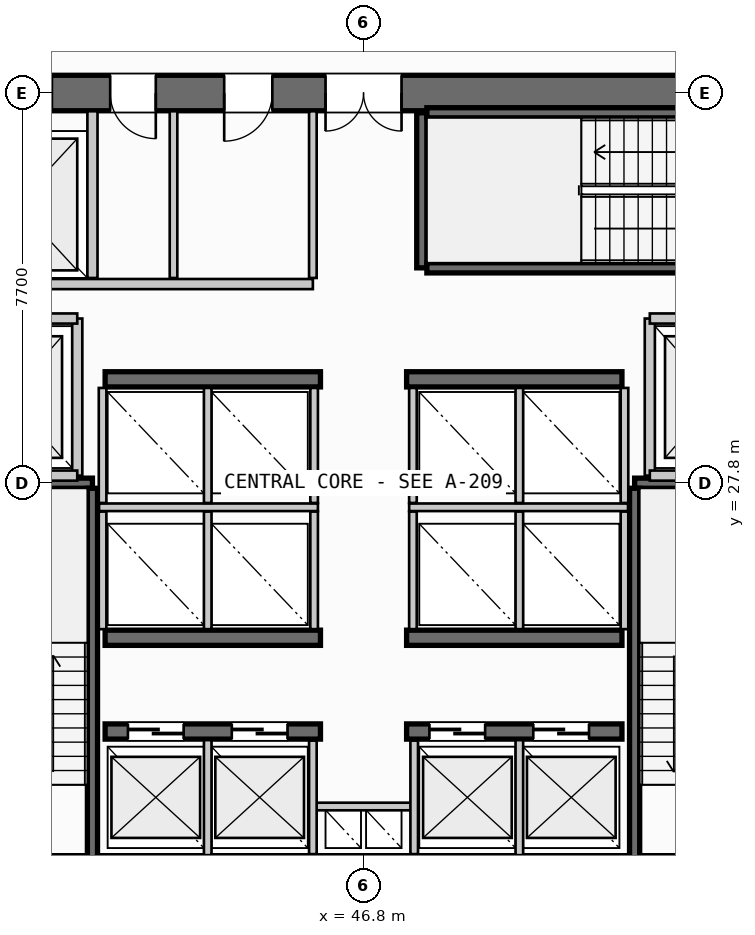
"""IFC4 building model, lengths in metres.
Left out: names, types, materials, properties, quantities, classifications, styles, units other than length and angle.
Written with IfcOpenShell. Run it as: python <this file> out.ifc"""

import sys

from ifc_helpers import new_model, si_unit, direction, frame, frame_2d, origin, place, context, subcontext, project, spatial, rectangle, extrude, source, transform, mapped, element, fill, save


model = new_model("IFC4")
c1 = context("Model", 3, precision=1e-05, world=origin(), true_north=direction((0.0, 1.0)))
c2 = subcontext(c1, "Body", "Model", "MODEL_VIEW")
j1 = project(units=[si_unit("LENGTHUNIT", "METRE"), si_unit("PLANEANGLEUNIT", "RADIAN")], contexts=[c1])
p1 = place(None, origin())
s1 = spatial("IfcSite", under=j1, at=p1, CompositionType="ELEMENT")
p2 = place(p1, origin())
s2 = spatial("IfcBuilding", under=s1, at=p2, CompositionType="ELEMENT")
p3 = place(p2, frame((0.0, 0.0, 63.8)))
s3 = spatial("IfcBuildingStorey", under=s2, at=p3, CompositionType="ELEMENT", Elevation=63.8)
p4 = place(p3, frame((38.0, 20.1, 0.0), z_axis=(0.0, 0.0, 1.0), x_axis=(1.0, 0.0, 0.0)))
e1 = element("IfcWall", 1, at=p4, inside=s3, PredefinedType="SHEAR", context=c2, shape_type="SweptSolid", body=[
    extrude(rectangle(XDim=17.6, YDim=0.7, at=frame_2d((8.8, 0.0))), origin(), (0.0, 0.0, 1.0), 3.55),
])
p5 = place(p4, frame((1.4, 0.0, 0.0)))
e2 = element("IfcOpeningElement", 2, at=p5, cuts=e1, PredefinedType="OPENING", context=c2, shape_type="SweptSolid", body=[
    extrude(rectangle(XDim=1.05, YDim=2.15, at=frame_2d((0.525, 1.075))), frame((0.0, 0.36, 0.0), z_axis=(0.0, -1.0, 0.0), x_axis=(1.0, 0.0, 0.0)), (0.0, 0.0, 1.0), 0.72),
])
p6 = place(p4, frame((15.15, 0.0, 0.0)))
e3 = element("IfcOpeningElement", 3, at=p6, cuts=e1, PredefinedType="OPENING", context=c2, shape_type="SweptSolid", body=[
    extrude(rectangle(XDim=1.05, YDim=2.15, at=frame_2d((0.525, 1.075))), frame((0.0, 0.36, 0.0), z_axis=(0.0, -1.0, 0.0), x_axis=(1.0, 0.0, 0.0)), (0.0, 0.0, 1.0), 0.72),
])
p7 = place(p3, frame((55.6, 35.5, 0.0), z_axis=(0.0, 0.0, 1.0), x_axis=(-1.0, 0.0, 0.0)))
e4 = element("IfcWall", 4, at=p7, inside=s3, PredefinedType="SHEAR", context=c2, shape_type="SweptSolid", body=[
    extrude(rectangle(XDim=17.6, YDim=0.7, at=frame_2d((8.8, 0.0))), origin(), (0.0, 0.0, 1.0), 3.55),
])
p8 = place(p7, frame((8.05, 0.0, 0.0)))
e5 = element("IfcOpeningElement", 5, at=p8, cuts=e4, PredefinedType="OPENING", context=c2, shape_type="SweptSolid", body=[
    extrude(rectangle(XDim=1.5, YDim=2.2, at=frame_2d((0.75, 1.1))), frame((0.0, 0.36, 0.0), z_axis=(0.0, -1.0, 0.0), x_axis=(1.0, 0.0, 0.0)), (0.0, 0.0, 1.0), 0.72),
])
p9 = place(p7, frame((14.95, 0.0, 0.0)))
e6 = element("IfcOpeningElement", 6, at=p9, cuts=e4, PredefinedType="OPENING", context=c2, shape_type="SweptSolid", body=[
    extrude(rectangle(XDim=1.4, YDim=2.3, at=frame_2d((0.7, 1.15))), frame((0.0, 0.36, 0.0), z_axis=(0.0, -1.0, 0.0), x_axis=(1.0, 0.0, 0.0)), (0.0, 0.0, 1.0), 0.72),
])
p10 = place(p7, frame((12.9, 0.0, 0.0)))
e7 = element("IfcOpeningElement", 7, at=p10, cuts=e4, PredefinedType="OPENING", context=c2, shape_type="SweptSolid", body=[
    extrude(rectangle(XDim=0.9, YDim=2.15, at=frame_2d((0.45, 1.075))), frame((0.0, 0.36, 0.0), z_axis=(0.0, -1.0, 0.0), x_axis=(1.0, 0.0, 0.0)), (0.0, 0.0, 1.0), 0.72),
])
p11 = place(p7, frame((10.6, 0.0, 0.0)))
e8 = element("IfcOpeningElement", 8, at=p11, cuts=e4, PredefinedType="OPENING", context=c2, shape_type="SweptSolid", body=[
    extrude(rectangle(XDim=0.95, YDim=2.15, at=frame_2d((0.475, 1.075))), frame((0.0, 0.36, 0.0), z_axis=(0.0, -1.0, 0.0), x_axis=(1.0, 0.0, 0.0)), (0.0, 0.0, 1.0), 0.72),
])
p12 = place(p3, frame((41.7, 22.9, 0.0), z_axis=(0.0, 0.0, 1.0), x_axis=(1.0, 0.0, 0.0)))
e9 = element("IfcWall", 9, at=p12, inside=s3, PredefinedType="SHEAR", context=c2, shape_type="SweptSolid", body=[
    extrude(rectangle(XDim=4.25, YDim=0.3, at=frame_2d((2.125, 0.0))), origin(), (0.0, 0.0, 1.0), 3.55),
])
p13 = place(p12, frame((0.45, 0.0, 0.0)))
e10 = element("IfcOpeningElement", 10, at=p13, cuts=e9, PredefinedType="OPENING", context=c2, shape_type="SweptSolid", body=[
    extrude(rectangle(XDim=1.1, YDim=2.2, at=frame_2d((0.55, 1.1))), frame((0.0, 0.16, 0.0), z_axis=(0.0, -1.0, 0.0), x_axis=(1.0, 0.0, 0.0)), (0.0, 0.0, 1.0), 0.32),
])
p14 = place(p12, frame((2.5, 0.0, 0.0)))
e11 = element("IfcOpeningElement", 11, at=p14, cuts=e9, PredefinedType="OPENING", context=c2, shape_type="SweptSolid", body=[
    extrude(rectangle(XDim=1.1, YDim=2.2, at=frame_2d((0.55, 1.1))), frame((0.0, 0.16, 0.0), z_axis=(0.0, -1.0, 0.0), x_axis=(1.0, 0.0, 0.0)), (0.0, 0.0, 1.0), 0.32),
])
p15 = place(p3, frame((47.65, 22.9, 0.0), z_axis=(0.0, 0.0, 1.0), x_axis=(1.0, 0.0, 0.0)))
e12 = element("IfcWall", 12, at=p15, inside=s3, PredefinedType="SHEAR", context=c2, shape_type="SweptSolid", body=[
    extrude(rectangle(XDim=4.25, YDim=0.3, at=frame_2d((2.125, 0.0))), origin(), (0.0, 0.0, 1.0), 3.55),
])
p16 = place(p15, frame((0.45, 0.0, 0.0)))
e13 = element("IfcOpeningElement", 13, at=p16, cuts=e12, PredefinedType="OPENING", context=c2, shape_type="SweptSolid", body=[
    extrude(rectangle(XDim=1.1, YDim=2.2, at=frame_2d((0.55, 1.1))), frame((0.0, 0.16, 0.0), z_axis=(0.0, -1.0, 0.0), x_axis=(1.0, 0.0, 0.0)), (0.0, 0.0, 1.0), 0.32),
])
p17 = place(p15, frame((2.5, 0.0, 0.0)))
e14 = element("IfcOpeningElement", 14, at=p17, cuts=e12, PredefinedType="OPENING", context=c2, shape_type="SweptSolid", body=[
    extrude(rectangle(XDim=1.1, YDim=2.2, at=frame_2d((0.55, 1.1))), frame((0.0, 0.16, 0.0), z_axis=(0.0, -1.0, 0.0), x_axis=(1.0, 0.0, 0.0)), (0.0, 0.0, 1.0), 0.32),
])
for number, where, z_axis, x_axis in (
    (15, (41.7, 24.75, 0.0), (0.0, 0.0, 1.0), (1.0, 0.0, 0.0)),
    (16, (47.65, 24.75, 0.0), (0.0, 0.0, 1.0), (1.0, 0.0, 0.0)),
    (17, (41.7, 29.85, 0.0), (0.0, 0.0, 1.0), (1.0, 0.0, 0.0)),
    (18, (47.65, 29.85, 0.0), (0.0, 0.0, 1.0), (1.0, 0.0, 0.0)),
):
    element("IfcWall", number, at=place(p3, frame(where, z_axis=z_axis, x_axis=x_axis)), inside=s3, PredefinedType="SHEAR", context=c2, shape_type="SweptSolid", body=[
        extrude(rectangle(XDim=4.25, YDim=0.3, at=frame_2d((2.125, 0.0))), origin(), (0.0, 0.0, 1.0), 3.55),
    ])
p18 = place(p3, frame((38.39, 27.8, 0.0), z_axis=(0.0, 0.0, 1.0), x_axis=(1.0, 0.0, 0.0)))
e19 = element("IfcWall", 19, at=p18, inside=s3, PredefinedType="SHEAR", context=c2, shape_type="SweptSolid", body=[
    extrude(rectangle(XDim=3.06, YDim=0.2, at=frame_2d((1.53, 0.0))), origin(), (0.0, 0.0, 1.0), 3.55),
])
p19 = place(p3, frame((41.45, 27.7, 0.0), z_axis=(0.0, 0.0, 1.0), x_axis=(0.0, -1.0, 0.0)))
e20 = element("IfcWall", 20, at=p19, inside=s3, PredefinedType="SHEAR", context=c2, shape_type="SweptSolid", body=[
    extrude(rectangle(XDim=7.35, YDim=0.2, at=frame_2d((3.675, 0.0))), origin(), (0.0, 0.0, 1.0), 3.55),
])
p20 = place(p3, frame((52.15, 27.8, 0.0), z_axis=(0.0, 0.0, 1.0), x_axis=(1.0, 0.0, 0.0)))
e21 = element("IfcWall", 21, at=p20, inside=s3, PredefinedType="SHEAR", context=c2, shape_type="SweptSolid", body=[
    extrude(rectangle(XDim=3.06, YDim=0.2, at=frame_2d((1.53, 0.0))), origin(), (0.0, 0.0, 1.0), 3.55),
])
p21 = place(p3, frame((52.15, 20.35, 0.0), z_axis=(0.0, 0.0, 1.0), x_axis=(0.0, 1.0, 0.0)))
e22 = element("IfcWall", 22, at=p21, inside=s3, PredefinedType="SHEAR", context=c2, shape_type="SweptSolid", body=[
    extrude(rectangle(XDim=7.35, YDim=0.2, at=frame_2d((3.675, 0.0))), origin(), (0.0, 0.0, 1.0), 3.55),
])
p22 = place(p3, frame((47.95, 32.05, 0.0), z_axis=(0.0, 0.0, 1.0), x_axis=(0.0, 1.0, 0.0)))
e23 = element("IfcWall", 23, at=p22, inside=s3, PredefinedType="SHEAR", context=c2, shape_type="SweptSolid", body=[
    extrude(rectangle(XDim=3.06, YDim=0.2, at=frame_2d((1.53, 0.0))), origin(), (0.0, 0.0, 1.0), 3.55),
])
for number, where, z_axis, x_axis in (
    (24, (48.05, 35.11, 0.0), (0.0, 0.0, 1.0), (1.0, 0.0, 0.0)),
    (25, (55.4, 32.05, 0.0), (0.0, 0.0, 1.0), (-1.0, 0.0, 0.0)),
):
    element("IfcWall", number, at=place(p3, frame(where, z_axis=z_axis, x_axis=x_axis)), inside=s3, PredefinedType="SHEAR", context=c2, shape_type="SweptSolid", body=[
        extrude(rectangle(XDim=7.35, YDim=0.2, at=frame_2d((3.675, 0.0))), origin(), (0.0, 0.0, 1.0), 3.55),
    ])
p23 = place(p3, frame((45.8, 21.42, 0.0), z_axis=(0.0, 0.0, 1.0), x_axis=(1.0, 0.0, 0.0)))
e26 = element("IfcWall", 26, at=p23, inside=s3, PredefinedType="PARTITIONING", context=c2, shape_type="SweptSolid", body=[
    extrude(rectangle(XDim=2.0, YDim=0.15, at=frame_2d((1.0, 0.0))), origin(), (0.0, 0.0, 1.0), 2.505),
])
for number, where, z_axis, x_axis in (
    (27, (45.8, 20.48, 0.0), (0.0, 0.0, 1.0), (0.0, 1.0, 0.0)),
    (28, (47.8, 20.48, 0.0), (0.0, 0.0, 1.0), (0.0, 1.0, 0.0)),
):
    element("IfcWall", number, at=place(p3, frame(where, z_axis=z_axis, x_axis=x_axis)), inside=s3, PredefinedType="PARTITIONING", context=c2, shape_type="SweptSolid", body=[
        extrude(rectangle(XDim=2.24, YDim=0.15, at=frame_2d((1.12, 0.0))), origin(), (0.0, 0.0, 1.0), 2.505),
    ])
p24 = place(p3, frame((41.15, 27.95, 0.0), z_axis=(0.0, 0.0, 1.0), x_axis=(0.0, 1.0, 0.0)))
e29 = element("IfcWall", 29, at=p24, inside=s3, PredefinedType="PARTITIONING", context=c2, shape_type="SweptSolid", body=[
    extrude(rectangle(XDim=3.1, YDim=0.2, at=frame_2d((1.55, 0.0))), origin(), (0.0, 0.0, 1.0), 2.505),
])
for number, where, z_axis, x_axis in (
    (30, (38.36, 27.95, 0.0), (0.0, 0.0, 1.0), (1.0, 0.0, 0.0)),
    (31, (38.36, 31.05, 0.0), (0.0, 0.0, 1.0), (1.0, 0.0, 0.0)),
):
    element("IfcWall", number, at=place(p3, frame(where, z_axis=z_axis, x_axis=x_axis)), inside=s3, PredefinedType="PARTITIONING", context=c2, shape_type="SweptSolid", body=[
        extrude(rectangle(XDim=2.79, YDim=0.2, at=frame_2d((1.395, 0.0))), origin(), (0.0, 0.0, 1.0), 2.505),
    ])
p25 = place(p3, frame((52.45, 27.95, 0.0), z_axis=(0.0, 0.0, 1.0), x_axis=(0.0, 1.0, 0.0)))
e32 = element("IfcWall", 32, at=p25, inside=s3, PredefinedType="PARTITIONING", context=c2, shape_type="SweptSolid", body=[
    extrude(rectangle(XDim=3.1, YDim=0.2, at=frame_2d((1.55, 0.0))), origin(), (0.0, 0.0, 1.0), 2.505),
])
for number, where, z_axis, x_axis in (
    (33, (52.45, 27.95, 0.0), (0.0, 0.0, 1.0), (1.0, 0.0, 0.0)),
    (34, (52.45, 31.05, 0.0), (0.0, 0.0, 1.0), (1.0, 0.0, 0.0)),
):
    element("IfcWall", number, at=place(p3, frame(where, z_axis=z_axis, x_axis=x_axis)), inside=s3, PredefinedType="PARTITIONING", context=c2, shape_type="SweptSolid", body=[
        extrude(rectangle(XDim=2.79, YDim=0.2, at=frame_2d((1.395, 0.0))), origin(), (0.0, 0.0, 1.0), 2.505),
    ])
for number, where, z_axis, x_axis in (
    (35, (43.725, 20.46, 0.0), (0.0, 0.0, 1.0), (0.0, 1.0, 0.0)),
    (36, (49.875, 20.46, 0.0), (0.0, 0.0, 1.0), (0.0, 1.0, 0.0)),
):
    element("IfcWall", number, at=place(p3, frame(where, z_axis=z_axis, x_axis=x_axis)), inside=s3, PredefinedType="PARTITIONING", context=c2, shape_type="SweptSolid", body=[
        extrude(rectangle(XDim=2.27, YDim=0.15, at=frame_2d((1.135, 0.0))), origin(), (0.0, 0.0, 1.0), 2.505),
    ])
p26 = place(p3, frame((41.58, 27.325, 0.0), z_axis=(0.0, 0.0, 1.0), x_axis=(1.0, 0.0, 0.0)))
e37 = element("IfcWall", 37, at=p26, inside=s3, PredefinedType="PARTITIONING", context=c2, shape_type="SweptSolid", body=[
    extrude(rectangle(XDim=4.32, YDim=0.15, at=frame_2d((2.16, 0.0))), origin(), (0.0, 0.0, 1.0), 2.505),
])
p27 = place(p3, frame((47.7, 27.325, 0.0), z_axis=(0.0, 0.0, 1.0), x_axis=(1.0, 0.0, 0.0)))
e38 = element("IfcWall", 38, at=p27, inside=s3, PredefinedType="PARTITIONING", context=c2, shape_type="SweptSolid", body=[
    extrude(rectangle(XDim=4.32, YDim=0.15, at=frame_2d((2.16, 0.0))), origin(), (0.0, 0.0, 1.0), 2.505),
])
for number, where, z_axis, x_axis in (
    (39, (41.65, 24.92, 0.0), (0.0, 0.0, 1.0), (0.0, 1.0, 0.0)),
    (40, (43.725, 24.92, 0.0), (0.0, 0.0, 1.0), (0.0, 1.0, 0.0)),
    (41, (45.825, 24.92, 0.0), (0.0, 0.0, 1.0), (0.0, 1.0, 0.0)),
    (42, (47.775, 24.92, 0.0), (0.0, 0.0, 1.0), (0.0, 1.0, 0.0)),
    (43, (49.875, 24.92, 0.0), (0.0, 0.0, 1.0), (0.0, 1.0, 0.0)),
    (44, (51.95, 24.92, 0.0), (0.0, 0.0, 1.0), (0.0, 1.0, 0.0)),
):
    element("IfcWall", number, at=place(p3, frame(where, z_axis=z_axis, x_axis=x_axis)), inside=s3, PredefinedType="PARTITIONING", context=c2, shape_type="SweptSolid", body=[
        extrude(rectangle(XDim=2.32, YDim=0.15, at=frame_2d((1.16, 0.0))), origin(), (0.0, 0.0, 1.0), 2.505),
    ])
for number, where, z_axis, x_axis in (
    (45, (41.65, 27.41, 0.0), (0.0, 0.0, 1.0), (0.0, 1.0, 0.0)),
    (46, (43.725, 27.41, 0.0), (0.0, 0.0, 1.0), (0.0, 1.0, 0.0)),
    (47, (45.825, 27.41, 0.0), (0.0, 0.0, 1.0), (0.0, 1.0, 0.0)),
    (48, (47.775, 27.41, 0.0), (0.0, 0.0, 1.0), (0.0, 1.0, 0.0)),
    (49, (49.875, 27.41, 0.0), (0.0, 0.0, 1.0), (0.0, 1.0, 0.0)),
    (50, (51.95, 27.41, 0.0), (0.0, 0.0, 1.0), (0.0, 1.0, 0.0)),
):
    element("IfcWall", number, at=place(p3, frame(where, z_axis=z_axis, x_axis=x_axis)), inside=s3, PredefinedType="PARTITIONING", context=c2, shape_type="SweptSolid", body=[
        extrude(rectangle(XDim=2.27, YDim=0.15, at=frame_2d((1.135, 0.0))), origin(), (0.0, 0.0, 1.0), 2.505),
    ])
p28 = place(p3, frame((41.45, 31.85, 0.0), z_axis=(0.0, 0.0, 1.0), x_axis=(0.0, 1.0, 0.0)))
e51 = element("IfcWall", 51, at=p28, inside=s3, PredefinedType="PARTITIONING", context=c2, shape_type="SweptSolid", body=[
    extrude(rectangle(XDim=3.29, YDim=0.2, at=frame_2d((1.645, 0.0))), origin(), (0.0, 0.0, 1.0), 2.505),
])
p29 = place(p3, frame((38.36, 31.73, 0.0), z_axis=(0.0, 0.0, 1.0), x_axis=(1.0, 0.0, 0.0)))
e52 = element("IfcWall", 52, at=p29, inside=s3, PredefinedType="PARTITIONING", context=c2, shape_type="SweptSolid", body=[
    extrude(rectangle(XDim=7.44, YDim=0.2, at=frame_2d((3.72, 0.0))), origin(), (0.0, 0.0, 1.0), 2.505),
])
p30 = place(p3, frame((45.8, 31.85, 0.0), z_axis=(0.0, 0.0, 1.0), x_axis=(0.0, 1.0, 0.0)))
e53 = element("IfcWall", 53, at=p30, inside=s3, PredefinedType="PARTITIONING", context=c2, shape_type="SweptSolid", body=[
    extrude(rectangle(XDim=3.29, YDim=0.15, at=frame_2d((1.645, 0.0))), origin(), (0.0, 0.0, 1.0), 2.505),
])
p31 = place(p3, frame((43.05, 31.85, 0.0), z_axis=(0.0, 0.0, 1.0), x_axis=(0.0, 1.0, 0.0)))
e54 = element("IfcWall", 54, at=p31, inside=s3, PredefinedType="PLUMBINGWALL", context=c2, shape_type="SweptSolid", body=[
    extrude(rectangle(XDim=3.29, YDim=0.15, at=frame_2d((1.645, 0.0))), origin(), (0.0, 0.0, 1.0), 2.505),
])
m1 = source(origin(), c2, "Body", "SweptSolid", [
    extrude(rectangle(XDim=1.5, YDim=2.2, at=frame_2d((0.75, 1.1))), frame((0.0, 0.025, 0.0), z_axis=(0.0, -1.0, 0.0), x_axis=(1.0, 0.0, 0.0)), (0.0, 0.0, 1.0), 0.05),
])
p32 = place(p8, origin())
e55 = element("IfcDoor", 55, at=p32, inside=s3, OperationType="DOUBLE_DOOR_SINGLE_SWING", PredefinedType="DOOR", context=c2, shape_type="MappedRepresentation", body=[
    mapped(m1, transform((0.0, 0.0, 0.0), scale=1.0)),
])
fill(e5, e55)
m2 = source(origin(), c2, "Body", "SweptSolid", [
    extrude(rectangle(XDim=1.1, YDim=2.2, at=frame_2d((0.55, 1.1))), frame((0.0, 0.025, 0.0), z_axis=(0.0, -1.0, 0.0), x_axis=(1.0, 0.0, 0.0)), (0.0, 0.0, 1.0), 0.05),
])
p33 = place(p13, origin())
e56 = element("IfcDoor", 56, at=p33, inside=s3, OperationType="SLIDING_TO_LEFT", PredefinedType="DOOR", context=c2, shape_type="MappedRepresentation", body=[
    mapped(m2, transform((0.0, 0.0, 0.0), scale=1.0)),
])
fill(e10, e56)
p34 = place(p14, origin())
e57 = element("IfcDoor", 57, at=p34, inside=s3, OperationType="SLIDING_TO_LEFT", PredefinedType="DOOR", context=c2, shape_type="MappedRepresentation", body=[
    mapped(m2, transform((0.0, 0.0, 0.0), scale=1.0)),
])
fill(e11, e57)
p35 = place(p16, origin())
e58 = element("IfcDoor", 58, at=p35, inside=s3, OperationType="SLIDING_TO_LEFT", PredefinedType="DOOR", context=c2, shape_type="MappedRepresentation", body=[
    mapped(m2, transform((0.0, 0.0, 0.0), scale=1.0)),
])
fill(e13, e58)
p36 = place(p17, origin())
e59 = element("IfcDoor", 59, at=p36, inside=s3, OperationType="SLIDING_TO_LEFT", PredefinedType="DOOR", context=c2, shape_type="MappedRepresentation", body=[
    mapped(m2, transform((0.0, 0.0, 0.0), scale=1.0)),
])
fill(e14, e59)
m3 = source(origin(), c2, "Body", "SweptSolid", [
    extrude(rectangle(XDim=1.4, YDim=2.3, at=frame_2d((0.7, 1.15))), frame((0.0, 0.025, 0.0), z_axis=(0.0, -1.0, 0.0), x_axis=(1.0, 0.0, 0.0)), (0.0, 0.0, 1.0), 0.05),
])
p37 = place(p9, origin())
e60 = element("IfcDoor", 60, at=p37, inside=s3, OperationType="SLIDING_TO_RIGHT", PredefinedType="DOOR", context=c2, shape_type="MappedRepresentation", body=[
    mapped(m3, transform((0.0, 0.0, 0.0), scale=1.0)),
])
fill(e6, e60)
m4 = source(origin(), c2, "Body", "SweptSolid", [
    extrude(rectangle(XDim=0.9, YDim=2.15, at=frame_2d((0.45, 1.075))), frame((0.0, 0.025, 0.0), z_axis=(0.0, -1.0, 0.0), x_axis=(1.0, 0.0, 0.0)), (0.0, 0.0, 1.0), 0.05),
])
p38 = place(p10, origin())
e61 = element("IfcDoor", 61, at=p38, inside=s3, OperationType="SINGLE_SWING_LEFT", PredefinedType="DOOR", context=c2, shape_type="MappedRepresentation", body=[
    mapped(m4, transform((0.0, 0.0, 0.0), scale=1.0)),
])
fill(e7, e61)
m5 = source(origin(), c2, "Body", "SweptSolid", [
    extrude(rectangle(XDim=0.95, YDim=2.15, at=frame_2d((0.475, 1.075))), frame((0.0, 0.025, 0.0), z_axis=(0.0, -1.0, 0.0), x_axis=(1.0, 0.0, 0.0)), (0.0, 0.0, 1.0), 0.05),
])
p39 = place(p11, origin())
e62 = element("IfcDoor", 62, at=p39, inside=s3, OperationType="SINGLE_SWING_RIGHT", PredefinedType="DOOR", context=c2, shape_type="MappedRepresentation", body=[
    mapped(m5, transform((0.0, 0.0, 0.0), scale=1.0)),
])
fill(e8, e62)
save(model, sys.argv[1])
